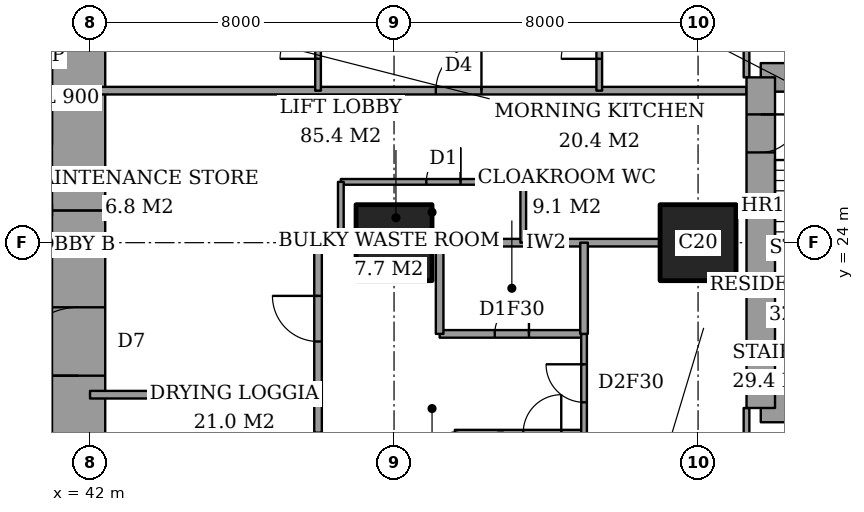
"""IFC4 building model, lengths in metres.
Left out: names, types, materials, properties, quantities, classifications, styles, units other than length and angle.
Written with IfcOpenShell. Run it as: python <this file> out.ifc"""

import sys

from ifc_helpers import new_model, si_unit, direction, frame, frame_2d, origin, origin_2d, place, context, subcontext, project, spatial, rectangle, extrude, element, fill, save


model = new_model("IFC4")
c1 = context("Model", 3, precision=1e-05, world=origin(), true_north=direction((0.0, 1.0)))
c2 = subcontext(c1, "Body", "Model", "MODEL_VIEW")
j1 = project(units=[si_unit("LENGTHUNIT", "METRE"), si_unit("PLANEANGLEUNIT", "RADIAN")], contexts=[c1])
p1 = place(None, origin())
s1 = spatial("IfcSite", under=j1, at=p1, CompositionType="ELEMENT")
p2 = place(p1, origin())
s2 = spatial("IfcBuilding", under=s1, at=p2, CompositionType="ELEMENT")
p3 = place(p2, frame((0.0, 0.0, 135.8)))
s3 = spatial("IfcBuildingStorey", under=s2, at=p3, CompositionType="ELEMENT", Elevation=135.8)
for number, where, z_axis, x_axis in (
    (1, (50.0, 24.0, 0.0), (0.0, 0.0, 1.0), (1.0, 0.0, 0.0)),
    (2, (58.0, 24.0, 0.0), (0.0, 0.0, 1.0), (1.0, 0.0, 0.0)),
):
    element("IfcColumn", number, at=place(p3, frame(where, z_axis=z_axis, x_axis=x_axis)), inside=s3, PredefinedType="COLUMN", context=c2, shape_type="SweptSolid", body=[
        extrude(rectangle(XDim=2.0, YDim=2.0, at=origin_2d()), origin(), (0.0, 0.0, 1.0), 3.6),
    ])
p4 = place(p3, frame((41.7, 13.0, 0.0), z_axis=(0.0, 0.0, 1.0), x_axis=(0.0, 1.0, 0.0)))
e3 = element("IfcWall", 3, at=p4, inside=s3, PredefinedType="SHEAR", context=c2, shape_type="SweptSolid", body=[
    extrude(rectangle(XDim=11.85, YDim=1.4, at=frame_2d((5.925, 0.0))), origin(), (0.0, 0.0, 1.0), 3.6),
])
p5 = place(p4, frame((7.5, 0.0, 0.0)))
e4 = element("IfcOpeningElement", 4, at=p5, cuts=e3, PredefinedType="OPENING", context=c2, shape_type="SweptSolid", body=[
    extrude(rectangle(XDim=1.8, YDim=2.4, at=frame_2d((0.9, 1.2))), frame((0.0, 0.71, 0.0), z_axis=(0.0, -1.0, 0.0), x_axis=(1.0, 0.0, 0.0)), (0.0, 0.0, 1.0), 1.42),
])
p6 = place(p3, frame((41.7, 24.85, 0.0), z_axis=(0.0, 0.0, 1.0), x_axis=(0.0, 1.0, 0.0)))
e5 = element("IfcWall", 5, at=p6, inside=s3, PredefinedType="SHEAR", context=c2, shape_type="SweptSolid", body=[
    extrude(rectangle(XDim=10.15, YDim=1.4, at=frame_2d((5.075, 0.0))), origin(), (0.0, 0.0, 1.0), 3.6),
])
for number, where, z_axis, x_axis in (
    (6, (59.65, 19.65, 0.0), (0.0, 0.0, 1.0), (1.0, 0.0, 0.0)),
    (7, (64.1, 28.35, 0.0), (0.0, 0.0, 1.0), (-1.0, 0.0, 0.0)),
):
    element("IfcWall", number, at=place(p3, frame(where, z_axis=z_axis, x_axis=x_axis)), inside=s3, PredefinedType="SHEAR", context=c2, shape_type="SweptSolid", body=[
        extrude(rectangle(XDim=4.45, YDim=0.75, at=frame_2d((2.225, 0.0))), origin(), (0.0, 0.0, 1.0), 3.6),
    ])
p7 = place(p3, frame((59.65, 28.35, 0.0), z_axis=(0.0, 0.0, 1.0), x_axis=(0.0, -1.0, 0.0)))
e8 = element("IfcWall", 8, at=p7, inside=s3, PredefinedType="SHEAR", context=c2, shape_type="SweptSolid", body=[
    extrude(rectangle(XDim=8.7, YDim=0.75, at=frame_2d((4.35, 0.0))), origin(), (0.0, 0.0, 1.0), 3.6),
])
p8 = place(p7, frame((0.975, 0.0, 0.0)))
e9 = element("IfcOpeningElement", 9, at=p8, cuts=e8, PredefinedType="OPENING", context=c2, shape_type="SweptSolid", body=[
    extrude(rectangle(XDim=1.0, YDim=2.1, at=frame_2d((0.5, 1.05))), frame((0.0, 0.385, 0.0), z_axis=(0.0, -1.0, 0.0), x_axis=(1.0, 0.0, 0.0)), (0.0, 0.0, 1.0), 0.77),
])
p9 = place(p3, frame((51.6, 19.0, 0.0), z_axis=(0.0, 0.0, 1.0), x_axis=(1.0, 0.0, 0.0)))
e10 = element("IfcWall", 10, at=p9, inside=s3, PredefinedType="PARTITIONING", context=c2, shape_type="SweptSolid", body=[
    extrude(rectangle(XDim=3.4, YDim=0.15, at=frame_2d((1.7, 0.0))), origin(), (0.0, 0.0, 1.0), 3.35),
])
p10 = place(p9, frame((1.8, 0.0, 0.0)))
e11 = element("IfcOpeningElement", 11, at=p10, cuts=e10, PredefinedType="OPENING", context=c2, shape_type="SweptSolid", body=[
    extrude(rectangle(XDim=1.0, YDim=2.1, at=frame_2d((0.5, 1.05))), frame((0.0, 0.085, 0.0), z_axis=(0.0, -1.0, 0.0), x_axis=(1.0, 0.0, 0.0)), (0.0, 0.0, 1.0), 0.17),
])
p11 = place(p3, frame((42.0, 20.0, 0.0), z_axis=(0.0, 0.0, 1.0), x_axis=(1.0, 0.0, 0.0)))
e12 = element("IfcWall", 12, at=p11, inside=s3, PredefinedType="PARTITIONING", context=c2, shape_type="SweptSolid", body=[
    extrude(rectangle(XDim=6.0, YDim=0.2, at=frame_2d((3.0, 0.0))), origin(), (0.0, 0.0, 1.0), 3.35),
])
p12 = place(p3, frame((51.2, 21.6, 0.0), z_axis=(0.0, 0.0, 1.0), x_axis=(1.0, 0.0, 0.0)))
e13 = element("IfcWall", 13, at=p12, inside=s3, PredefinedType="PARTITIONING", context=c2, shape_type="SweptSolid", body=[
    extrude(rectangle(XDim=3.8, YDim=0.2, at=frame_2d((1.9, 0.0))), origin(), (0.0, 0.0, 1.0), 3.35),
])
p13 = place(p12, frame((1.45, 0.0, 0.0)))
e14 = element("IfcOpeningElement", 14, at=p13, cuts=e13, PredefinedType="OPENING", context=c2, shape_type="SweptSolid", body=[
    extrude(rectangle(XDim=0.9, YDim=2.1, at=frame_2d((0.45, 1.05))), frame((0.0, 0.11, 0.0), z_axis=(0.0, -1.0, 0.0), x_axis=(1.0, 0.0, 0.0)), (0.0, 0.0, 1.0), 0.22),
])
p14 = place(p3, frame((48.0, 24.0, 0.0), z_axis=(0.0, 0.0, 1.0), x_axis=(1.0, 0.0, 0.0)))
e15 = element("IfcWall", 15, at=p14, inside=s3, PredefinedType="PARTITIONING", context=c2, shape_type="SweptSolid", body=[
    extrude(rectangle(XDim=1.0, YDim=0.2, at=frame_2d((0.5, 0.0))), origin(), (0.0, 0.0, 1.0), 3.35),
])
p15 = place(p3, frame((51.0, 24.0, 0.0), z_axis=(0.0, 0.0, 1.0), x_axis=(1.0, 0.0, 0.0)))
e16 = element("IfcWall", 16, at=p15, inside=s3, PredefinedType="PARTITIONING", context=c2, shape_type="SweptSolid", body=[
    extrude(rectangle(XDim=6.0, YDim=0.2, at=frame_2d((3.0, 0.0))), origin(), (0.0, 0.0, 1.0), 3.35),
])
p16 = place(p3, frame((48.6, 25.6, 0.0), z_axis=(0.0, 0.0, 1.0), x_axis=(1.0, 0.0, 0.0)))
e17 = element("IfcWall", 17, at=p16, inside=s3, PredefinedType="PARTITIONING", context=c2, shape_type="SweptSolid", body=[
    extrude(rectangle(XDim=4.8, YDim=0.15, at=frame_2d((2.4, 0.0))), origin(), (0.0, 0.0, 1.0), 3.35),
])
p17 = place(p16, frame((2.25, 0.0, 0.0)))
e18 = element("IfcOpeningElement", 18, at=p17, cuts=e17, PredefinedType="OPENING", context=c2, shape_type="SweptSolid", body=[
    extrude(rectangle(XDim=0.9, YDim=2.1, at=frame_2d((0.45, 1.05))), frame((0.0, 0.085, 0.0), z_axis=(0.0, -1.0, 0.0), x_axis=(1.0, 0.0, 0.0)), (0.0, 0.0, 1.0), 0.17),
])
p18 = place(p3, frame((42.0, 28.0, 0.0), z_axis=(0.0, 0.0, 1.0), x_axis=(1.0, 0.0, 0.0)))
e19 = element("IfcWall", 19, at=p18, inside=s3, PredefinedType="PARTITIONING", context=c2, shape_type="SweptSolid", body=[
    extrude(rectangle(XDim=17.275, YDim=0.2, at=frame_2d((8.637, 0.0))), origin(), (0.0, 0.0, 1.0), 3.35),
])
p19 = place(p18, frame((9.1, 0.0, 0.0)))
e20 = element("IfcOpeningElement", 20, at=p19, cuts=e19, PredefinedType="OPENING", context=c2, shape_type="SweptSolid", body=[
    extrude(rectangle(XDim=1.2, YDim=2.4, at=frame_2d((0.6, 1.2))), frame((0.0, 0.11, 0.0), z_axis=(0.0, -1.0, 0.0), x_axis=(1.0, 0.0, 0.0)), (0.0, 0.0, 1.0), 0.22),
])
p20 = place(p3, frame((48.0, 19.0, 0.0), z_axis=(0.0, 0.0, 1.0), x_axis=(0.0, 1.0, 0.0)))
e21 = element("IfcWall", 21, at=p20, inside=s3, PredefinedType="PARTITIONING", context=c2, shape_type="SweptSolid", body=[
    extrude(rectangle(XDim=5.0, YDim=0.2, at=frame_2d((2.5, 0.0))), origin(), (0.0, 0.0, 1.0), 3.35),
])
p21 = place(p20, frame((2.4, 0.0, 0.0)))
e22 = element("IfcOpeningElement", 22, at=p21, cuts=e21, PredefinedType="OPENING", context=c2, shape_type="SweptSolid", body=[
    extrude(rectangle(XDim=1.2, YDim=2.4, at=frame_2d((0.6, 1.2))), frame((0.0, 0.11, 0.0), z_axis=(0.0, -1.0, 0.0), x_axis=(1.0, 0.0, 0.0)), (0.0, 0.0, 1.0), 0.22),
])
p22 = place(p3, frame((48.0, 28.0, 0.0), z_axis=(0.0, 0.0, 1.0), x_axis=(0.0, 1.0, 0.0)))
e23 = element("IfcWall", 23, at=p22, inside=s3, PredefinedType="PARTITIONING", context=c2, shape_type="SweptSolid", body=[
    extrude(rectangle(XDim=9.4, YDim=0.15, at=frame_2d((4.7, 0.0))), origin(), (0.0, 0.0, 1.0), 3.35),
])
p23 = place(p22, frame((0.837, 0.0, 0.0)))
e24 = element("IfcOpeningElement", 24, at=p23, cuts=e23, PredefinedType="OPENING", context=c2, shape_type="SweptSolid", body=[
    extrude(rectangle(XDim=1.0, YDim=2.1, at=frame_2d((0.5, 1.05))), frame((0.0, 0.085, 0.0), z_axis=(0.0, -1.0, 0.0), x_axis=(1.0, 0.0, 0.0)), (0.0, 0.0, 1.0), 0.17),
])
p24 = place(p3, frame((48.6, 24.0, 0.0), z_axis=(0.0, 0.0, 1.0), x_axis=(0.0, 1.0, 0.0)))
e25 = element("IfcWall", 25, at=p24, inside=s3, PredefinedType="PARTITIONING", context=c2, shape_type="SweptSolid", body=[
    extrude(rectangle(XDim=1.6, YDim=0.15, at=frame_2d((0.8, 0.0))), origin(), (0.0, 0.0, 1.0), 3.35),
])
p25 = place(p3, frame((51.2, 21.6, 0.0), z_axis=(0.0, 0.0, 1.0), x_axis=(0.0, 1.0, 0.0)))
e26 = element("IfcWall", 26, at=p25, inside=s3, PredefinedType="PARTITIONING", context=c2, shape_type="SweptSolid", body=[
    extrude(rectangle(XDim=2.4, YDim=0.2, at=frame_2d((1.2, 0.0))), origin(), (0.0, 0.0, 1.0), 3.35),
])
p26 = place(p3, frame((51.6, 16.05, 0.0), z_axis=(0.0, 0.0, 1.0), x_axis=(0.0, 1.0, 0.0)))
e27 = element("IfcWall", 27, at=p26, inside=s3, PredefinedType="PARTITIONING", context=c2, shape_type="SweptSolid", body=[
    extrude(rectangle(XDim=2.95, YDim=0.15, at=frame_2d((1.475, 0.0))), origin(), (0.0, 0.0, 1.0), 3.35),
])
p27 = place(p3, frame((53.4, 24.0, 0.0), z_axis=(0.0, 0.0, 1.0), x_axis=(0.0, 1.0, 0.0)))
e28 = element("IfcWall", 28, at=p27, inside=s3, PredefinedType="PARTITIONING", context=c2, shape_type="SweptSolid", body=[
    extrude(rectangle(XDim=1.6, YDim=0.15, at=frame_2d((0.8, 0.0))), origin(), (0.0, 0.0, 1.0), 3.35),
])
p28 = place(p3, frame((55.0, 21.6, 0.0), z_axis=(0.0, 0.0, 1.0), x_axis=(0.0, 1.0, 0.0)))
e29 = element("IfcWall", 29, at=p28, inside=s3, PredefinedType="PARTITIONING", context=c2, shape_type="SweptSolid", body=[
    extrude(rectangle(XDim=2.4, YDim=0.2, at=frame_2d((1.2, 0.0))), origin(), (0.0, 0.0, 1.0), 3.35),
])
p29 = place(p3, frame((55.0, 10.6, 0.0), z_axis=(0.0, 0.0, 1.0), x_axis=(0.0, 1.0, 0.0)))
e30 = element("IfcWall", 30, at=p29, inside=s3, PredefinedType="PARTITIONING", context=c2, shape_type="SweptSolid", body=[
    extrude(rectangle(XDim=11.0, YDim=0.15, at=frame_2d((5.5, 0.0))), origin(), (0.0, 0.0, 1.0), 3.35),
])
p30 = place(p29, frame((9.2, 0.0, 0.0)))
e31 = element("IfcOpeningElement", 31, at=p30, cuts=e30, PredefinedType="OPENING", context=c2, shape_type="SweptSolid", body=[
    extrude(rectangle(XDim=1.0, YDim=2.1, at=frame_2d((0.5, 1.05))), frame((0.0, 0.085, 0.0), z_axis=(0.0, -1.0, 0.0), x_axis=(1.0, 0.0, 0.0)), (0.0, 0.0, 1.0), 0.17),
])
p31 = place(p3, frame((55.4, 28.0, 0.0), z_axis=(0.0, 0.0, 1.0), x_axis=(0.0, 1.0, 0.0)))
e32 = element("IfcWall", 32, at=p31, inside=s3, PredefinedType="PARTITIONING", context=c2, shape_type="SweptSolid", body=[
    extrude(rectangle(XDim=9.4, YDim=0.15, at=frame_2d((4.7, 0.0))), origin(), (0.0, 0.0, 1.0), 3.35),
])
p32 = place(p31, frame((0.837, 0.0, 0.0)))
e33 = element("IfcOpeningElement", 33, at=p32, cuts=e32, PredefinedType="OPENING", context=c2, shape_type="SweptSolid", body=[
    extrude(rectangle(XDim=1.0, YDim=2.1, at=frame_2d((0.5, 1.05))), frame((0.0, 0.085, 0.0), z_axis=(0.0, -1.0, 0.0), x_axis=(1.0, 0.0, 0.0)), (0.0, 0.0, 1.0), 0.17),
])
p33 = place(p3, frame((59.275, 17.2, 0.0), z_axis=(0.0, 0.0, 1.0), x_axis=(0.0, 1.0, 0.0)))
e34 = element("IfcWall", 34, at=p33, inside=s3, PredefinedType="PARTITIONING", context=c2, shape_type="SweptSolid", body=[
    extrude(rectangle(XDim=2.45, YDim=0.15, at=frame_2d((1.225, 0.0))), origin(), (0.0, 0.0, 1.0), 3.35),
])
p34 = place(p33, frame((0.538, 0.0, 0.0)))
e35 = element("IfcOpeningElement", 35, at=p34, cuts=e34, PredefinedType="OPENING", context=c2, shape_type="SweptSolid", body=[
    extrude(rectangle(XDim=1.0, YDim=2.1, at=frame_2d((0.5, 1.05))), frame((0.0, 0.085, 0.0), z_axis=(0.0, -1.0, 0.0), x_axis=(1.0, 0.0, 0.0)), (0.0, 0.0, 1.0), 0.17),
])
p35 = place(p3, frame((59.275, 28.35, 0.0), z_axis=(0.0, 0.0, 1.0), x_axis=(0.0, 1.0, 0.0)))
e36 = element("IfcWall", 36, at=p35, inside=s3, PredefinedType="PARTITIONING", context=c2, shape_type="SweptSolid", body=[
    extrude(rectangle(XDim=2.45, YDim=0.15, at=frame_2d((1.225, 0.0))), origin(), (0.0, 0.0, 1.0), 3.35),
])
p36 = place(p35, frame((0.913, 0.0, 0.0)))
e37 = element("IfcOpeningElement", 37, at=p36, cuts=e36, PredefinedType="OPENING", context=c2, shape_type="SweptSolid", body=[
    extrude(rectangle(XDim=1.0, YDim=2.1, at=frame_2d((0.5, 1.05))), frame((0.0, 0.085, 0.0), z_axis=(0.0, -1.0, 0.0), x_axis=(1.0, 0.0, 0.0)), (0.0, 0.0, 1.0), 0.17),
])
p37 = place(p30, origin())
e38 = element("IfcDoor", 38, at=p37, inside=s3, OperationType="SINGLE_SWING_LEFT", PredefinedType="DOOR", context=c2, shape_type="SweptSolid", body=[
    extrude(rectangle(XDim=1.0, YDim=2.1, at=frame_2d((0.5, 1.05))), frame((0.0, 0.025, 0.0), z_axis=(0.0, -1.0, 0.0), x_axis=(1.0, 0.0, 0.0)), (0.0, 0.0, 1.0), 0.05),
])
fill(e31, e38)
p38 = place(p13, origin())
e39 = element("IfcDoor", 39, at=p38, inside=s3, OperationType="SINGLE_SWING_LEFT", PredefinedType="DOOR", context=c2, shape_type="SweptSolid", body=[
    extrude(rectangle(XDim=0.9, YDim=2.1, at=frame_2d((0.45, 1.05))), frame((0.0, 0.025, 0.0), z_axis=(0.0, -1.0, 0.0), x_axis=(1.0, 0.0, 0.0)), (0.0, 0.0, 1.0), 0.05),
])
fill(e14, e39)
p39 = place(p21, origin())
e40 = element("IfcDoor", 40, at=p39, inside=s3, OperationType="SINGLE_SWING_LEFT", PredefinedType="DOOR", context=c2, shape_type="SweptSolid", body=[
    extrude(rectangle(XDim=1.2, YDim=2.4, at=frame_2d((0.6, 1.2))), frame((0.0, 0.025, 0.0), z_axis=(0.0, -1.0, 0.0), x_axis=(1.0, 0.0, 0.0)), (0.0, 0.0, 1.0), 0.05),
])
fill(e22, e40)
p40 = place(p10, origin())
e41 = element("IfcDoor", 41, at=p40, inside=s3, OperationType="SINGLE_SWING_LEFT", PredefinedType="DOOR", context=c2, shape_type="SweptSolid", body=[
    extrude(rectangle(XDim=1.0, YDim=2.1, at=frame_2d((0.5, 1.05))), frame((0.0, 0.025, 0.0), z_axis=(0.0, -1.0, 0.0), x_axis=(1.0, 0.0, 0.0)), (0.0, 0.0, 1.0), 0.05),
])
fill(e11, e41)
p41 = place(p32, origin())
e42 = element("IfcDoor", 42, at=p41, inside=s3, OperationType="SINGLE_SWING_RIGHT", PredefinedType="DOOR", context=c2, shape_type="SweptSolid", body=[
    extrude(rectangle(XDim=1.0, YDim=2.1, at=frame_2d((0.5, 1.05))), frame((0.0, 0.025, 0.0), z_axis=(0.0, -1.0, 0.0), x_axis=(1.0, 0.0, 0.0)), (0.0, 0.0, 1.0), 0.05),
])
fill(e33, e42)
p42 = place(p19, origin())
e43 = element("IfcDoor", 43, at=p42, inside=s3, OperationType="SINGLE_SWING_LEFT", PredefinedType="DOOR", context=c2, shape_type="SweptSolid", body=[
    extrude(rectangle(XDim=1.2, YDim=2.4, at=frame_2d((0.6, 1.2))), frame((0.0, 0.025, 0.0), z_axis=(0.0, -1.0, 0.0), x_axis=(1.0, 0.0, 0.0)), (0.0, 0.0, 1.0), 0.05),
])
fill(e20, e43)
p43 = place(p23, origin())
e44 = element("IfcDoor", 44, at=p43, inside=s3, OperationType="SINGLE_SWING_RIGHT", PredefinedType="DOOR", context=c2, shape_type="SweptSolid", body=[
    extrude(rectangle(XDim=1.0, YDim=2.1, at=frame_2d((0.5, 1.05))), frame((0.0, 0.025, 0.0), z_axis=(0.0, -1.0, 0.0), x_axis=(1.0, 0.0, 0.0)), (0.0, 0.0, 1.0), 0.05),
])
fill(e24, e44)
p44 = place(p17, origin())
e45 = element("IfcDoor", 45, at=p44, inside=s3, OperationType="SINGLE_SWING_LEFT", PredefinedType="DOOR", context=c2, shape_type="SweptSolid", body=[
    extrude(rectangle(XDim=0.9, YDim=2.1, at=frame_2d((0.45, 1.05))), frame((0.0, 0.025, 0.0), z_axis=(0.0, -1.0, 0.0), x_axis=(1.0, 0.0, 0.0)), (0.0, 0.0, 1.0), 0.05),
])
fill(e18, e45)
p45 = place(p5, origin())
e46 = element("IfcDoor", 46, at=p45, inside=s3, OperationType="DOUBLE_DOOR_DOUBLE_SWING", PredefinedType="DOOR", context=c2, shape_type="SweptSolid", body=[
    extrude(rectangle(XDim=1.8, YDim=2.4, at=frame_2d((0.9, 1.2))), frame((0.0, 0.025, 0.0), z_axis=(0.0, -1.0, 0.0), x_axis=(1.0, 0.0, 0.0)), (0.0, 0.0, 1.0), 0.05),
])
fill(e4, e46)
p46 = place(p8, origin())
e47 = element("IfcDoor", 47, at=p46, inside=s3, OperationType="SINGLE_SWING_RIGHT", PredefinedType="DOOR", context=c2, shape_type="SweptSolid", body=[
    extrude(rectangle(XDim=1.0, YDim=2.1, at=frame_2d((0.5, 1.05))), frame((0.0, 0.025, 0.0), z_axis=(0.0, -1.0, 0.0), x_axis=(1.0, 0.0, 0.0)), (0.0, 0.0, 1.0), 0.05),
])
fill(e9, e47)
save(model, sys.argv[1])
